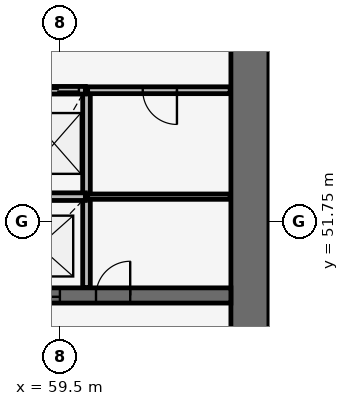
"""IFC4 building model, lengths in metres.
Left out: names, types, materials, properties, quantities, classifications, styles, units other than length and angle.
Written with IfcOpenShell. Run it as: python <this file> out.ifc"""

import sys

from ifc_helpers import new_model, si_unit, direction, frame, frame_2d, origin, place, context, subcontext, project, spatial, rectangle, extrude, source, transform, mapped, element, fill, save


model = new_model("IFC4")
c1 = context("Model", 3, precision=1e-05, world=origin(), true_north=direction((0.0, 1.0)))
c2 = subcontext(c1, "Body", "Model", "MODEL_VIEW")
j1 = project(units=[si_unit("LENGTHUNIT", "METRE"), si_unit("PLANEANGLEUNIT", "RADIAN")], contexts=[c1])
p1 = place(None, origin())
s1 = spatial("IfcSite", under=j1, at=p1, CompositionType="ELEMENT")
p2 = place(p1, origin())
s2 = spatial("IfcBuilding", under=s1, at=p2, CompositionType="ELEMENT")
p3 = place(p2, origin())
s3 = spatial("IfcBuildingStorey", under=s2, at=p3, CompositionType="ELEMENT", Elevation=0.0)
p4 = place(p3, frame((64.5, 38.0, -0.35), z_axis=(0.0, 0.0, 1.0), x_axis=(0.0, 1.0, 0.0)))
e1 = element("IfcWall", 1, at=p4, inside=s3, PredefinedType="SHEAR", context=c2, shape_type="SweptSolid", body=[
    extrude(rectangle(XDim=20.0, YDim=1.0, at=frame_2d((10.0, 0.0))), origin(), (0.0, 0.0, 1.0), 5.35),
])
p5 = place(p4, frame((9.1, 0.0, 0.35)))
e2 = element("IfcOpeningElement", 2, at=p5, cuts=e1, PredefinedType="OPENING", context=c2, shape_type="SweptSolid", body=[
    extrude(rectangle(XDim=1.8, YDim=2.1, at=frame_2d((0.9, 1.05))), frame((0.0, 0.51, 0.0), z_axis=(0.0, -1.0, 0.0), x_axis=(1.0, 0.0, 0.0)), (0.0, 0.0, 1.0), 1.02),
])
p6 = place(p3, frame((40.0, 49.8, -0.35), z_axis=(0.0, 0.0, 1.0), x_axis=(1.0, 0.0, 0.0)))
e3 = element("IfcWall", 3, at=p6, inside=s3, PredefinedType="SHEAR", context=c2, shape_type="SweptSolid", body=[
    extrude(rectangle(XDim=24.0, YDim=0.4, at=frame_2d((12.0, 0.0))), origin(), (0.0, 0.0, 1.0), 5.35),
])
p7 = place(p6, frame((13.4, 0.0, 0.35)))
e4 = element("IfcOpeningElement", 4, at=p7, cuts=e3, PredefinedType="OPENING", context=c2, shape_type="SweptSolid", body=[
    extrude(rectangle(XDim=1.1, YDim=2.1, at=frame_2d((0.55, 1.05))), frame((0.0, 0.21, 0.0), z_axis=(0.0, -1.0, 0.0), x_axis=(1.0, 0.0, 0.0)), (0.0, 0.0, 1.0), 0.42),
])
p8 = place(p6, frame((15.9, 0.0, 0.35)))
e5 = element("IfcOpeningElement", 5, at=p8, cuts=e3, PredefinedType="OPENING", context=c2, shape_type="SweptSolid", body=[
    extrude(rectangle(XDim=1.1, YDim=2.1, at=frame_2d((0.55, 1.05))), frame((0.0, 0.21, 0.0), z_axis=(0.0, -1.0, 0.0), x_axis=(1.0, 0.0, 0.0)), (0.0, 0.0, 1.0), 0.42),
])
p9 = place(p6, frame((18.4, 0.0, 0.35)))
e6 = element("IfcOpeningElement", 6, at=p9, cuts=e3, PredefinedType="OPENING", context=c2, shape_type="SweptSolid", body=[
    extrude(rectangle(XDim=1.1, YDim=2.1, at=frame_2d((0.55, 1.05))), frame((0.0, 0.21, 0.0), z_axis=(0.0, -1.0, 0.0), x_axis=(1.0, 0.0, 0.0)), (0.0, 0.0, 1.0), 0.42),
])
p10 = place(p6, frame((4.5, 0.0, 0.35)))
e7 = element("IfcOpeningElement", 7, at=p10, cuts=e3, PredefinedType="OPENING", context=c2, shape_type="SweptSolid", body=[
    extrude(rectangle(XDim=1.1, YDim=2.1, at=frame_2d((0.55, 1.05))), frame((0.0, 0.21, 0.0), z_axis=(0.0, -1.0, 0.0), x_axis=(1.0, 0.0, 0.0)), (0.0, 0.0, 1.0), 0.42),
])
p11 = place(p6, frame((7.0, 0.0, 0.35)))
e8 = element("IfcOpeningElement", 8, at=p11, cuts=e3, PredefinedType="OPENING", context=c2, shape_type="SweptSolid", body=[
    extrude(rectangle(XDim=1.1, YDim=2.1, at=frame_2d((0.55, 1.05))), frame((0.0, 0.21, 0.0), z_axis=(0.0, -1.0, 0.0), x_axis=(1.0, 0.0, 0.0)), (0.0, 0.0, 1.0), 0.42),
])
p12 = place(p6, frame((9.5, 0.0, 0.35)))
e9 = element("IfcOpeningElement", 9, at=p12, cuts=e3, PredefinedType="OPENING", context=c2, shape_type="SweptSolid", body=[
    extrude(rectangle(XDim=1.1, YDim=2.1, at=frame_2d((0.55, 1.05))), frame((0.0, 0.21, 0.0), z_axis=(0.0, -1.0, 0.0), x_axis=(1.0, 0.0, 0.0)), (0.0, 0.0, 1.0), 0.42),
])
p13 = place(p6, frame((0.9, 0.0, 0.35)))
e10 = element("IfcOpeningElement", 10, at=p13, cuts=e3, PredefinedType="OPENING", context=c2, shape_type="SweptSolid", body=[
    extrude(rectangle(XDim=1.8, YDim=2.4, at=frame_2d((0.9, 1.2))), frame((0.0, 0.21, 0.0), z_axis=(0.0, -1.0, 0.0), x_axis=(1.0, 0.0, 0.0)), (0.0, 0.0, 1.0), 0.42),
])
p14 = place(p6, frame((20.45, 0.0, 0.35)))
e11 = element("IfcOpeningElement", 11, at=p14, cuts=e3, PredefinedType="OPENING", context=c2, shape_type="SweptSolid", body=[
    extrude(rectangle(XDim=0.9, YDim=2.1, at=frame_2d((0.45, 1.05))), frame((0.0, 0.21, 0.0), z_axis=(0.0, -1.0, 0.0), x_axis=(1.0, 0.0, 0.0)), (0.0, 0.0, 1.0), 0.42),
])
p15 = place(p6, frame((11.65, 0.0, 0.35)))
e12 = element("IfcOpeningElement", 12, at=p15, cuts=e3, PredefinedType="OPENING", context=c2, shape_type="SweptSolid", body=[
    extrude(rectangle(XDim=0.9, YDim=2.1, at=frame_2d((0.45, 1.05))), frame((0.0, 0.21, 0.0), z_axis=(0.0, -1.0, 0.0), x_axis=(1.0, 0.0, 0.0)), (0.0, 0.0, 1.0), 0.42),
])
p16 = place(p3, frame((60.2, 52.4, 0.0), z_axis=(0.0, 0.0, 1.0), x_axis=(0.0, 1.0, 0.0)))
e13 = element("IfcWall", 13, at=p16, inside=s3, PredefinedType="SOLIDWALL", context=c2, shape_type="SweptSolid", body=[
    extrude(rectangle(XDim=2.8, YDim=0.2, at=frame_2d((1.4, 0.0))), origin(), (0.0, 0.0, 1.0), 4.65),
])
p17 = place(p3, frame((60.2, 50.01, 0.0), z_axis=(0.0, 0.0, 1.0), x_axis=(0.0, 1.0, 0.0)))
e14 = element("IfcWall", 14, at=p17, inside=s3, PredefinedType="SOLIDWALL", context=c2, shape_type="SweptSolid", body=[
    extrude(rectangle(XDim=2.36, YDim=0.2, at=frame_2d((1.18, 0.0))), origin(), (0.0, 0.0, 1.0), 4.65),
])
p18 = place(p3, frame((60.17, 52.4, 0.0), z_axis=(0.0, 0.0, 1.0), x_axis=(-1.0, 0.0, 0.0)))
e15 = element("IfcWall", 15, at=p18, inside=s3, PredefinedType="SOLIDWALL", context=c2, shape_type="SweptSolid", body=[
    extrude(rectangle(XDim=1.64, YDim=0.2, at=frame_2d((0.82, 0.0))), origin(), (0.0, 0.0, 1.0), 4.65),
])
p19 = place(p3, frame((60.17, 55.2, 0.0), z_axis=(0.0, 0.0, 1.0), x_axis=(-1.0, 0.0, 0.0)))
e16 = element("IfcWall", 16, at=p19, inside=s3, PredefinedType="SOLIDWALL", context=c2, shape_type="SweptSolid", body=[
    extrude(rectangle(XDim=1.64, YDim=0.2, at=frame_2d((0.82, 0.0))), origin(), (0.0, 0.0, 1.0), 4.65),
])
p20 = place(p19, frame((0.17, 0.0, 0.0)))
e17 = element("IfcOpeningElement", 17, at=p20, cuts=e16, PredefinedType="OPENING", context=c2, shape_type="SweptSolid", body=[
    extrude(rectangle(XDim=1.1, YDim=2.1, at=frame_2d((0.55, 1.05))), frame((0.0, 0.11, 0.0), z_axis=(0.0, -1.0, 0.0), x_axis=(1.0, 0.0, 0.0)), (0.0, 0.0, 1.0), 0.22),
])
p21 = place(p3, frame((63.98, 55.2, 0.0), z_axis=(0.0, 0.0, 1.0), x_axis=(-1.0, 0.0, 0.0)))
e18 = element("IfcWall", 18, at=p21, inside=s3, PredefinedType="PARTITIONING", context=c2, shape_type="SweptSolid", body=[
    extrude(rectangle(XDim=3.75, YDim=0.18, at=frame_2d((1.875, 0.0))), origin(), (0.0, 0.0, 1.0), 4.65),
])
p22 = place(p21, frame((1.4, 0.0, 0.0)))
e19 = element("IfcOpeningElement", 19, at=p22, cuts=e18, PredefinedType="OPENING", context=c2, shape_type="SweptSolid", body=[
    extrude(rectangle(XDim=0.9, YDim=2.1, at=frame_2d((0.45, 1.05))), frame((0.0, 0.1, 0.0), z_axis=(0.0, -1.0, 0.0), x_axis=(1.0, 0.0, 0.0)), (0.0, 0.0, 1.0), 0.2),
])
p23 = place(p3, frame((63.98, 52.4, 0.0), z_axis=(0.0, 0.0, 1.0), x_axis=(-1.0, 0.0, 0.0)))
e20 = element("IfcWall", 20, at=p23, inside=s3, PredefinedType="PARTITIONING", context=c2, shape_type="SweptSolid", body=[
    extrude(rectangle(XDim=3.75, YDim=0.14, at=frame_2d((1.875, 0.0))), origin(), (0.0, 0.0, 1.0), 3.85),
])
m1 = source(origin(), c2, "Body", "SweptSolid", [
    extrude(rectangle(XDim=1.1, YDim=2.1, at=frame_2d((0.55, 1.05))), frame((0.0, 0.025, 0.0), z_axis=(0.0, -1.0, 0.0), x_axis=(1.0, 0.0, 0.0)), (0.0, 0.0, 1.0), 0.05),
])
p24 = place(p9, origin())
e21 = element("IfcDoor", 21, at=p24, inside=s3, OperationType="DOUBLE_DOOR_SLIDING", PredefinedType="USERDEFINED", context=c2, shape_type="MappedRepresentation", body=[
    mapped(m1, transform((0.0, 0.0, 0.0), scale=1.0)),
])
fill(e6, e21)
p25 = place(p20, origin())
e22 = element("IfcDoor", 22, at=p25, inside=s3, OperationType="DOUBLE_DOOR_SLIDING", PredefinedType="USERDEFINED", context=c2, shape_type="MappedRepresentation", body=[
    mapped(m1, transform((0.0, 0.0, 0.0), scale=1.0)),
])
fill(e17, e22)
m2 = source(origin(), c2, "Body", "SweptSolid", [
    extrude(rectangle(XDim=0.9, YDim=2.1, at=frame_2d((0.45, 1.05))), frame((0.0, 0.025, 0.0), z_axis=(0.0, -1.0, 0.0), x_axis=(1.0, 0.0, 0.0)), (0.0, 0.0, 1.0), 0.05),
])
p26 = place(p14, origin())
e23 = element("IfcDoor", 23, at=p26, inside=s3, OperationType="SINGLE_SWING_RIGHT", PredefinedType="DOOR", context=c2, shape_type="MappedRepresentation", body=[
    mapped(m2, transform((0.0, 0.0, 0.0), scale=1.0)),
])
fill(e11, e23)
p27 = place(p22, origin())
e24 = element("IfcDoor", 24, at=p27, inside=s3, OperationType="SINGLE_SWING_LEFT", PredefinedType="DOOR", context=c2, shape_type="MappedRepresentation", body=[
    mapped(m2, transform((0.0, 0.0, 0.0), scale=1.0)),
])
fill(e19, e24)
save(model, sys.argv[1])
